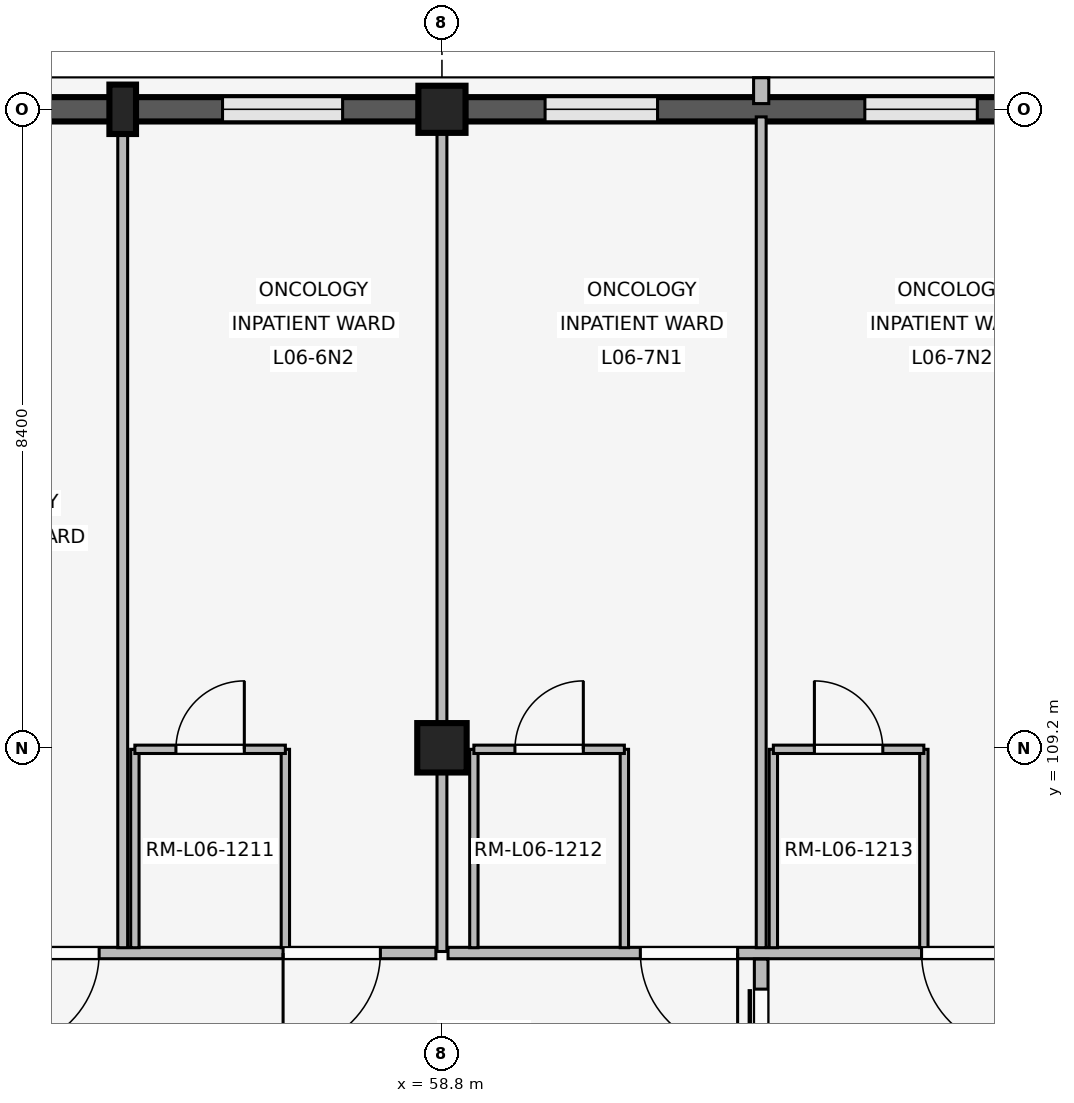
"""IFC4 building model, lengths in metres.
Left out: names, types, materials, properties, quantities, classifications, styles, units other than length and angle.
Written with IfcOpenShell. Run it as: python <this file> out.ifc"""

import sys

from ifc_helpers import new_model, si_unit, direction, frame, frame_2d, origin, origin_2d, place, context, subcontext, project, spatial, rectangle, extrude, element, fill, save


model = new_model("IFC4")
c1 = context("Model", 3, precision=1e-05, world=origin(), true_north=direction((0.0, 1.0)))
c2 = subcontext(c1, "Body", "Model", "MODEL_VIEW")
j1 = project(units=[si_unit("LENGTHUNIT", "METRE"), si_unit("PLANEANGLEUNIT", "RADIAN")], contexts=[c1])
p1 = place(None, origin())
s1 = spatial("IfcSite", under=j1, at=p1, CompositionType="ELEMENT")
p2 = place(p1, origin())
s2 = spatial("IfcBuilding", under=s1, at=p2, CompositionType="ELEMENT")
p3 = place(p2, frame((0.0, 0.0, 24.6)))
s3 = spatial("IfcBuildingStorey", under=s2, at=p3, CompositionType="ELEMENT", Elevation=24.6)
p4 = place(p3, frame((58.8, 109.2, 0.0), z_axis=(0.0, 0.0, 1.0), x_axis=(1.0, 0.0, 0.0)))
e1 = element("IfcColumn", 1, at=p4, inside=s3, PredefinedType="COLUMN", context=c2, shape_type="SweptSolid", body=[
    extrude(rectangle(XDim=0.65, YDim=0.65, at=origin_2d()), origin(), (0.0, 0.0, 1.0), 4.2),
])
p5 = place(p3, frame((58.8, 117.6, 0.0), z_axis=(0.0, 0.0, 1.0), x_axis=(1.0, 0.0, 0.0)))
e2 = element("IfcColumn", 2, at=p5, inside=s3, PredefinedType="COLUMN", context=c2, shape_type="SweptSolid", body=[
    extrude(rectangle(XDim=0.62, YDim=0.62, at=origin_2d()), origin(), (0.0, 0.0, 1.0), 4.2),
])
p6 = place(p3, frame((54.6, 117.6, 0.0), z_axis=(0.0, 0.0, 1.0), x_axis=(1.0, 0.0, 0.0)))
e3 = element("IfcColumn", 3, at=p6, inside=s3, PredefinedType="PILASTER", context=c2, shape_type="SweptSolid", body=[
    extrude(rectangle(XDim=0.35, YDim=0.65, at=origin_2d()), origin(), (0.0, 0.0, 1.0), 4.2),
])
p7 = place(p3, frame((50.705, 117.6, 0.0), z_axis=(0.0, 0.0, 1.0), x_axis=(1.0, 0.0, 0.0)))
e4 = element("IfcWall", 4, at=p7, inside=s3, PredefinedType="SOLIDWALL", context=c2, shape_type="SweptSolid", body=[
    extrude(rectangle(XDim=7.79, YDim=0.32, at=frame_2d((3.895, 0.0))), origin(), (0.0, 0.0, 1.0), 3.34),
])
p8 = place(p7, frame((1.002, 0.0, 0.85)))
e5 = element("IfcOpeningElement", 5, at=p8, cuts=e4, PredefinedType="OPENING", context=c2, shape_type="SweptSolid", body=[
    extrude(rectangle(XDim=1.58, YDim=1.7, at=frame_2d((0.79, 0.85))), frame((0.0, 0.17, 0.0), z_axis=(0.0, -1.0, 0.0), x_axis=(1.0, 0.0, 0.0)), (0.0, 0.0, 1.0), 0.34),
])
p9 = place(p7, frame((5.208, 0.0, 0.85)))
e6 = element("IfcOpeningElement", 6, at=p9, cuts=e4, PredefinedType="OPENING", context=c2, shape_type="SweptSolid", body=[
    extrude(rectangle(XDim=1.58, YDim=1.7, at=frame_2d((0.79, 0.85))), frame((0.0, 0.17, 0.0), z_axis=(0.0, -1.0, 0.0), x_axis=(1.0, 0.0, 0.0)), (0.0, 0.0, 1.0), 0.34),
])
p10 = place(p3, frame((59.105, 117.6, 0.0), z_axis=(0.0, 0.0, 1.0), x_axis=(1.0, 0.0, 0.0)))
e7 = element("IfcWall", 7, at=p10, inside=s3, PredefinedType="SOLIDWALL", context=c2, shape_type="SweptSolid", body=[
    extrude(rectangle(XDim=7.79, YDim=0.32, at=frame_2d((3.895, 0.0))), origin(), (0.0, 0.0, 1.0), 3.34),
])
p11 = place(p10, frame((1.052, 0.0, 0.85)))
e8 = element("IfcOpeningElement", 8, at=p11, cuts=e7, PredefinedType="OPENING", context=c2, shape_type="SweptSolid", body=[
    extrude(rectangle(XDim=1.48, YDim=1.6, at=frame_2d((0.74, 0.8))), frame((0.0, 0.17, 0.0), z_axis=(0.0, -1.0, 0.0), x_axis=(1.0, 0.0, 0.0)), (0.0, 0.0, 1.0), 0.34),
])
p12 = place(p10, frame((5.258, 0.0, 0.85)))
e9 = element("IfcOpeningElement", 9, at=p12, cuts=e7, PredefinedType="OPENING", context=c2, shape_type="SweptSolid", body=[
    extrude(rectangle(XDim=1.48, YDim=1.6, at=frame_2d((0.74, 0.8))), frame((0.0, 0.17, 0.0), z_axis=(0.0, -1.0, 0.0), x_axis=(1.0, 0.0, 0.0)), (0.0, 0.0, 1.0), 0.34),
])
p13 = place(p3, frame((63.0, 117.675, 0.0), z_axis=(0.0, 0.0, 1.0), x_axis=(0.0, 1.0, 0.0)))
e10 = element("IfcWall", 10, at=p13, inside=s3, PredefinedType="ELEMENTEDWALL", context=c2, shape_type="SweptSolid", body=[
    extrude(rectangle(XDim=0.34, YDim=0.2, at=frame_2d((0.17, 0.0))), origin(), (0.0, 0.0, 1.0), 3.32),
])
p14 = place(p3, frame((58.72, 106.5, 0.0), z_axis=(0.0, 0.0, 1.0), x_axis=(-1.0, 0.0, 0.0)))
e11 = element("IfcWall", 11, at=p14, inside=s3, PredefinedType="PARTITIONING", context=c2, shape_type="SweptSolid", body=[
    extrude(rectangle(XDim=7.96, YDim=0.15, at=frame_2d((3.98, 0.0))), origin(), (0.0, 0.0, 1.0), 3.32),
])
p15 = place(p14, frame((0.73, 0.0, 0.0)))
e12 = element("IfcOpeningElement", 12, at=p15, cuts=e11, PredefinedType="OPENING", context=c2, shape_type="SweptSolid", body=[
    extrude(rectangle(XDim=1.28, YDim=2.2, at=frame_2d((0.64, 1.1))), frame((0.0, 0.085, 0.0), z_axis=(0.0, -1.0, 0.0), x_axis=(1.0, 0.0, 0.0)), (0.0, 0.0, 1.0), 0.17),
])
p16 = place(p14, frame((4.43, 0.0, 0.0)))
e13 = element("IfcOpeningElement", 13, at=p16, cuts=e11, PredefinedType="OPENING", context=c2, shape_type="SweptSolid", body=[
    extrude(rectangle(XDim=1.28, YDim=2.2, at=frame_2d((0.64, 1.1))), frame((0.0, 0.085, 0.0), z_axis=(0.0, -1.0, 0.0), x_axis=(1.0, 0.0, 0.0)), (0.0, 0.0, 1.0), 0.17),
])
p17 = place(p3, frame((54.6, 106.57, 0.0), z_axis=(0.0, 0.0, 1.0), x_axis=(0.0, 1.0, 0.0)))
e14 = element("IfcWall", 14, at=p17, inside=s3, PredefinedType="PARTITIONING", context=c2, shape_type="SweptSolid", body=[
    extrude(rectangle(XDim=10.93, YDim=0.13, at=frame_2d((5.465, 0.0))), origin(), (0.0, 0.0, 1.0), 3.32),
])
for number, where, z_axis, x_axis in (
    (15, (54.76, 106.57, 0.0), (0.0, 0.0, 1.0), (0.0, 1.0, 0.0)),
    (16, (56.74, 106.57, 0.0), (0.0, 0.0, 1.0), (0.0, 1.0, 0.0)),
):
    element("IfcWall", number, at=place(p3, frame(where, z_axis=z_axis, x_axis=x_axis)), inside=s3, PredefinedType="PARTITIONING", context=c2, shape_type="SweptSolid", body=[
        extrude(rectangle(XDim=2.61, YDim=0.11, at=frame_2d((1.305, 0.0))), origin(), (0.0, 0.0, 1.0), 3.32),
    ])
p18 = place(p3, frame((54.76, 109.18, 0.0), z_axis=(0.0, 0.0, 1.0), x_axis=(1.0, 0.0, 0.0)))
e17 = element("IfcWall", 17, at=p18, inside=s3, PredefinedType="PARTITIONING", context=c2, shape_type="SweptSolid", body=[
    extrude(rectangle(XDim=1.98, YDim=0.11, at=frame_2d((0.99, 0.0))), origin(), (0.0, 0.0, 1.0), 3.32),
])
p19 = place(p18, frame((0.54, 0.0, 0.0)))
e18 = element("IfcOpeningElement", 18, at=p19, cuts=e17, PredefinedType="OPENING", context=c2, shape_type="SweptSolid", body=[
    extrude(rectangle(XDim=0.9, YDim=2.1, at=frame_2d((0.45, 1.05))), frame((0.0, 0.065, 0.0), z_axis=(0.0, -1.0, 0.0), x_axis=(1.0, 0.0, 0.0)), (0.0, 0.0, 1.0), 0.13),
])
p20 = place(p3, frame((58.8, 106.52, 0.0), z_axis=(0.0, 0.0, 1.0), x_axis=(0.0, 1.0, 0.0)))
e19 = element("IfcWall", 19, at=p20, inside=s3, PredefinedType="PARTITIONING", context=c2, shape_type="SweptSolid", body=[
    extrude(rectangle(XDim=10.94, YDim=0.13, at=frame_2d((5.47, 0.0))), origin(), (0.0, 0.0, 1.0), 3.32),
])
p21 = place(p3, frame((67.12, 106.5, 0.0), z_axis=(0.0, 0.0, 1.0), x_axis=(-1.0, 0.0, 0.0)))
e20 = element("IfcWall", 20, at=p21, inside=s3, PredefinedType="PARTITIONING", context=c2, shape_type="SweptSolid", body=[
    extrude(rectangle(XDim=8.24, YDim=0.15, at=frame_2d((4.12, 0.0))), origin(), (0.0, 0.0, 1.0), 3.32),
])
p22 = place(p21, frame((0.73, 0.0, 0.0)))
e21 = element("IfcOpeningElement", 21, at=p22, cuts=e20, PredefinedType="OPENING", context=c2, shape_type="SweptSolid", body=[
    extrude(rectangle(XDim=1.28, YDim=2.2, at=frame_2d((0.64, 1.1))), frame((0.0, 0.085, 0.0), z_axis=(0.0, -1.0, 0.0), x_axis=(1.0, 0.0, 0.0)), (0.0, 0.0, 1.0), 0.17),
])
p23 = place(p21, frame((4.43, 0.0, 0.0)))
e22 = element("IfcOpeningElement", 22, at=p23, cuts=e20, PredefinedType="OPENING", context=c2, shape_type="SweptSolid", body=[
    extrude(rectangle(XDim=1.28, YDim=2.2, at=frame_2d((0.64, 1.1))), frame((0.0, 0.085, 0.0), z_axis=(0.0, -1.0, 0.0), x_axis=(1.0, 0.0, 0.0)), (0.0, 0.0, 1.0), 0.17),
])
p24 = place(p3, frame((63.0, 106.57, 0.0), z_axis=(0.0, 0.0, 1.0), x_axis=(0.0, 1.0, 0.0)))
e23 = element("IfcWall", 23, at=p24, inside=s3, PredefinedType="PARTITIONING", context=c2, shape_type="SweptSolid", body=[
    extrude(rectangle(XDim=10.93, YDim=0.13, at=frame_2d((5.465, 0.0))), origin(), (0.0, 0.0, 1.0), 3.32),
])
for number, where, z_axis, x_axis in (
    (24, (59.22, 106.57, 0.0), (0.0, 0.0, 1.0), (0.0, 1.0, 0.0)),
    (25, (61.2, 106.57, 0.0), (0.0, 0.0, 1.0), (0.0, 1.0, 0.0)),
):
    element("IfcWall", number, at=place(p3, frame(where, z_axis=z_axis, x_axis=x_axis)), inside=s3, PredefinedType="PARTITIONING", context=c2, shape_type="SweptSolid", body=[
        extrude(rectangle(XDim=2.61, YDim=0.11, at=frame_2d((1.305, 0.0))), origin(), (0.0, 0.0, 1.0), 3.32),
    ])
p25 = place(p3, frame((59.22, 109.18, 0.0), z_axis=(0.0, 0.0, 1.0), x_axis=(1.0, 0.0, 0.0)))
e26 = element("IfcWall", 26, at=p25, inside=s3, PredefinedType="PARTITIONING", context=c2, shape_type="SweptSolid", body=[
    extrude(rectangle(XDim=1.98, YDim=0.11, at=frame_2d((0.99, 0.0))), origin(), (0.0, 0.0, 1.0), 3.32),
])
p26 = place(p25, frame((0.54, 0.0, 0.0)))
e27 = element("IfcOpeningElement", 27, at=p26, cuts=e26, PredefinedType="OPENING", context=c2, shape_type="SweptSolid", body=[
    extrude(rectangle(XDim=0.9, YDim=2.1, at=frame_2d((0.45, 1.05))), frame((0.0, 0.065, 0.0), z_axis=(0.0, -1.0, 0.0), x_axis=(1.0, 0.0, 0.0)), (0.0, 0.0, 1.0), 0.13),
])
for number, where, z_axis, x_axis in (
    (28, (63.16, 106.57, 0.0), (0.0, 0.0, 1.0), (0.0, 1.0, 0.0)),
    (29, (65.14, 106.57, 0.0), (0.0, 0.0, 1.0), (0.0, 1.0, 0.0)),
):
    element("IfcWall", number, at=place(p3, frame(where, z_axis=z_axis, x_axis=x_axis)), inside=s3, PredefinedType="PARTITIONING", context=c2, shape_type="SweptSolid", body=[
        extrude(rectangle(XDim=2.61, YDim=0.11, at=frame_2d((1.305, 0.0))), origin(), (0.0, 0.0, 1.0), 3.32),
    ])
p27 = place(p3, frame((63.16, 109.18, 0.0), z_axis=(0.0, 0.0, 1.0), x_axis=(1.0, 0.0, 0.0)))
e30 = element("IfcWall", 30, at=p27, inside=s3, PredefinedType="PARTITIONING", context=c2, shape_type="SweptSolid", body=[
    extrude(rectangle(XDim=1.98, YDim=0.11, at=frame_2d((0.99, 0.0))), origin(), (0.0, 0.0, 1.0), 3.32),
])
p28 = place(p27, frame((0.54, 0.0, 0.0)))
e31 = element("IfcOpeningElement", 31, at=p28, cuts=e30, PredefinedType="OPENING", context=c2, shape_type="SweptSolid", body=[
    extrude(rectangle(XDim=0.9, YDim=2.1, at=frame_2d((0.45, 1.05))), frame((0.0, 0.065, 0.0), z_axis=(0.0, -1.0, 0.0), x_axis=(1.0, 0.0, 0.0)), (0.0, 0.0, 1.0), 0.13),
])
p29 = place(p3, frame((63.0, 103.58, 0.0), z_axis=(0.0, 0.0, 1.0), x_axis=(0.0, 1.0, 0.0)))
e32 = element("IfcWall", 32, at=p29, inside=s3, PredefinedType="PARTITIONING", context=c2, shape_type="SweptSolid", body=[
    extrude(rectangle(XDim=2.84, YDim=0.18, at=frame_2d((1.42, 0.0))), origin(), (0.0, 0.0, 1.0), 3.32),
])
p30 = place(p29, frame((0.395, 0.0, 0.0)))
e33 = element("IfcOpeningElement", 33, at=p30, cuts=e32, PredefinedType="OPENING", context=c2, shape_type="SweptSolid", body=[
    extrude(rectangle(XDim=2.05, YDim=2.35, at=frame_2d((1.025, 1.175))), frame((0.0, 0.1, 0.0), z_axis=(0.0, -1.0, 0.0), x_axis=(1.0, 0.0, 0.0)), (0.0, 0.0, 1.0), 0.2),
])
p31 = place(p9, origin())
e34 = element("IfcWindow", 34, at=p31, inside=s3, PartitioningType="SINGLE_PANEL", PredefinedType="WINDOW", context=c2, shape_type="SweptSolid", body=[
    extrude(rectangle(XDim=1.58, YDim=1.7, at=frame_2d((0.79, 0.85))), frame((0.0, 0.03, 0.0), z_axis=(0.0, -1.0, 0.0), x_axis=(1.0, 0.0, 0.0)), (0.0, 0.0, 1.0), 0.06),
])
fill(e6, e34)
p32 = place(p11, origin())
e35 = element("IfcWindow", 35, at=p32, inside=s3, PartitioningType="SINGLE_PANEL", PredefinedType="WINDOW", context=c2, shape_type="SweptSolid", body=[
    extrude(rectangle(XDim=1.48, YDim=1.6, at=frame_2d((0.74, 0.8))), frame((0.0, 0.03, 0.0), z_axis=(0.0, -1.0, 0.0), x_axis=(1.0, 0.0, 0.0)), (0.0, 0.0, 1.0), 0.06),
])
fill(e8, e35)
p33 = place(p12, origin())
e36 = element("IfcWindow", 36, at=p33, inside=s3, PartitioningType="SINGLE_PANEL", PredefinedType="WINDOW", context=c2, shape_type="SweptSolid", body=[
    extrude(rectangle(XDim=1.48, YDim=1.6, at=frame_2d((0.74, 0.8))), frame((0.0, 0.03, 0.0), z_axis=(0.0, -1.0, 0.0), x_axis=(1.0, 0.0, 0.0)), (0.0, 0.0, 1.0), 0.06),
])
fill(e9, e36)
p34 = place(p15, origin())
e37 = element("IfcDoor", 37, at=p34, inside=s3, OperationType="SINGLE_SWING_RIGHT", PredefinedType="DOOR", context=c2, shape_type="SweptSolid", body=[
    extrude(rectangle(XDim=1.28, YDim=2.2, at=frame_2d((0.64, 1.1))), frame((0.0, 0.025, 0.0), z_axis=(0.0, -1.0, 0.0), x_axis=(1.0, 0.0, 0.0)), (0.0, 0.0, 1.0), 0.05),
])
fill(e12, e37)
p35 = place(p16, origin())
e38 = element("IfcDoor", 38, at=p35, inside=s3, OperationType="SINGLE_SWING_RIGHT", PredefinedType="DOOR", context=c2, shape_type="SweptSolid", body=[
    extrude(rectangle(XDim=1.28, YDim=2.2, at=frame_2d((0.64, 1.1))), frame((0.0, 0.025, 0.0), z_axis=(0.0, -1.0, 0.0), x_axis=(1.0, 0.0, 0.0)), (0.0, 0.0, 1.0), 0.05),
])
fill(e13, e38)
p36 = place(p19, origin())
e39 = element("IfcDoor", 39, at=p36, inside=s3, OperationType="SINGLE_SWING_RIGHT", PredefinedType="DOOR", context=c2, shape_type="SweptSolid", body=[
    extrude(rectangle(XDim=0.9, YDim=2.1, at=frame_2d((0.45, 1.05))), frame((0.0, 0.025, 0.0), z_axis=(0.0, -1.0, 0.0), x_axis=(1.0, 0.0, 0.0)), (0.0, 0.0, 1.0), 0.05),
])
fill(e18, e39)
p37 = place(p22, origin())
e40 = element("IfcDoor", 40, at=p37, inside=s3, OperationType="SINGLE_SWING_LEFT", PredefinedType="DOOR", context=c2, shape_type="SweptSolid", body=[
    extrude(rectangle(XDim=1.28, YDim=2.2, at=frame_2d((0.64, 1.1))), frame((0.0, 0.025, 0.0), z_axis=(0.0, -1.0, 0.0), x_axis=(1.0, 0.0, 0.0)), (0.0, 0.0, 1.0), 0.05),
])
fill(e21, e40)
p38 = place(p23, origin())
e41 = element("IfcDoor", 41, at=p38, inside=s3, OperationType="SINGLE_SWING_LEFT", PredefinedType="DOOR", context=c2, shape_type="SweptSolid", body=[
    extrude(rectangle(XDim=1.28, YDim=2.2, at=frame_2d((0.64, 1.1))), frame((0.0, 0.025, 0.0), z_axis=(0.0, -1.0, 0.0), x_axis=(1.0, 0.0, 0.0)), (0.0, 0.0, 1.0), 0.05),
])
fill(e22, e41)
p39 = place(p26, origin())
e42 = element("IfcDoor", 42, at=p39, inside=s3, OperationType="SINGLE_SWING_RIGHT", PredefinedType="DOOR", context=c2, shape_type="SweptSolid", body=[
    extrude(rectangle(XDim=0.9, YDim=2.1, at=frame_2d((0.45, 1.05))), frame((0.0, 0.025, 0.0), z_axis=(0.0, -1.0, 0.0), x_axis=(1.0, 0.0, 0.0)), (0.0, 0.0, 1.0), 0.05),
])
fill(e27, e42)
p40 = place(p28, origin())
e43 = element("IfcDoor", 43, at=p40, inside=s3, OperationType="SINGLE_SWING_LEFT", PredefinedType="DOOR", context=c2, shape_type="SweptSolid", body=[
    extrude(rectangle(XDim=0.9, YDim=2.1, at=frame_2d((0.45, 1.05))), frame((0.0, 0.025, 0.0), z_axis=(0.0, -1.0, 0.0), x_axis=(1.0, 0.0, 0.0)), (0.0, 0.0, 1.0), 0.05),
])
fill(e31, e43)
p41 = place(p30, origin())
e44 = element("IfcDoor", 44, at=p41, inside=s3, OperationType="SLIDING_TO_LEFT", PredefinedType="DOOR", context=c2, shape_type="SweptSolid", body=[
    extrude(rectangle(XDim=2.05, YDim=2.35, at=frame_2d((1.025, 1.175))), frame((0.0, 0.025, 0.0), z_axis=(0.0, -1.0, 0.0), x_axis=(1.0, 0.0, 0.0)), (0.0, 0.0, 1.0), 0.05),
])
fill(e33, e44)
save(model, sys.argv[1])
